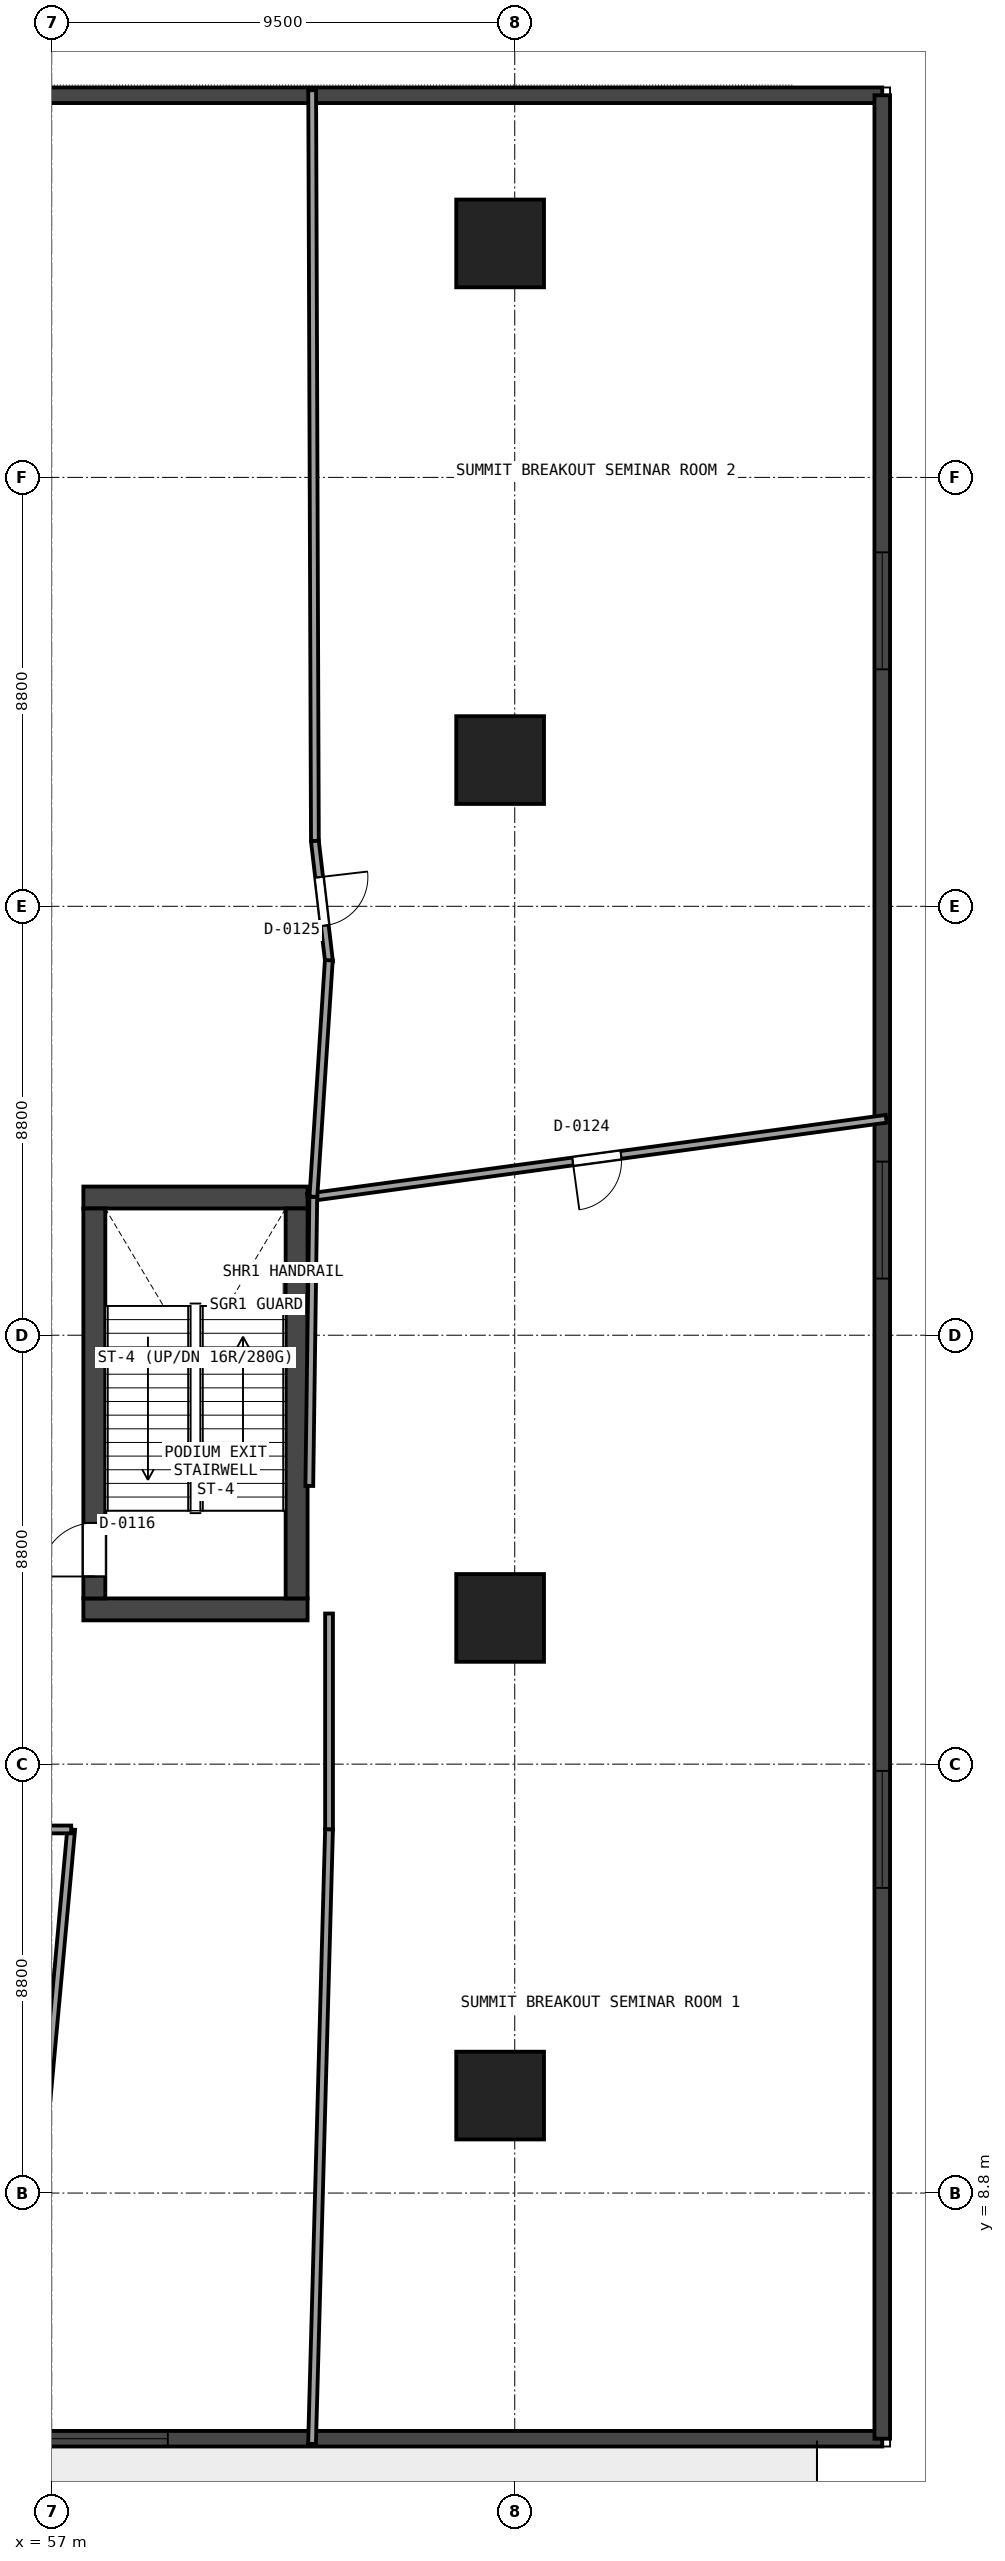
"""IFC4 building model, lengths in metres.
Left out: names, types, materials, properties, quantities, classifications, styles, units other than length and angle.
Written with IfcOpenShell. Run it as: python <this file> out.ifc"""

import sys

from ifc_helpers import new_model, si_unit, direction, frame, frame_2d, origin, origin_2d, place, context, subcontext, project, spatial, rectangle, extrude, element, fill, save


model = new_model("IFC4")
c1 = context("Model", 3, precision=1e-05, world=origin(), true_north=direction((0.0, 1.0)))
c2 = subcontext(c1, "Body", "Model", "MODEL_VIEW")
j1 = project(units=[si_unit("LENGTHUNIT", "METRE"), si_unit("PLANEANGLEUNIT", "RADIAN")], contexts=[c1])
p1 = place(None, origin())
s1 = spatial("IfcSite", under=j1, at=p1, CompositionType="ELEMENT")
p2 = place(p1, origin())
s2 = spatial("IfcBuilding", under=s1, at=p2, CompositionType="ELEMENT")
p3 = place(p2, frame((0.0, 0.0, 5.4)))
s3 = spatial("IfcBuildingStorey", under=s2, at=p3, CompositionType="ELEMENT", Elevation=5.4)
for number, where, z_axis, x_axis in (
    (1, (57.65, 20.775, 0.0), (0.0, 0.0, 1.0), (1.0, 0.0, 0.0)),
    (2, (57.65, 29.225, 0.0), (0.0, 0.0, 1.0), (1.0, 0.0, 0.0)),
):
    element("IfcWall", number, at=place(p3, frame(where, z_axis=z_axis, x_axis=x_axis)), inside=s3, PredefinedType="SHEAR", context=c2, shape_type="SweptSolid", body=[
        extrude(rectangle(XDim=4.6, YDim=0.45, at=frame_2d((2.3, 0.0))), origin(), (0.0, 0.0, 1.0), 5.05),
    ])
p4 = place(p3, frame((57.875, 21.0, 0.0), z_axis=(0.0, 0.0, 1.0), x_axis=(0.0, 1.0, 0.0)))
e3 = element("IfcWall", 3, at=p4, inside=s3, PredefinedType="SHEAR", context=c2, shape_type="SweptSolid", body=[
    extrude(rectangle(XDim=8.0, YDim=0.45, at=frame_2d((4.0, 0.0))), origin(), (0.0, 0.0, 1.0), 5.05),
])
p5 = place(p4, frame((0.45, 0.0, 0.0)))
e4 = element("IfcOpeningElement", 4, at=p5, cuts=e3, PredefinedType="OPENING", context=c2, shape_type="SweptSolid", body=[
    extrude(rectangle(XDim=1.1, YDim=2.15, at=frame_2d((0.55, 1.075))), frame((0.0, 0.235, 0.0), z_axis=(0.0, -1.0, 0.0), x_axis=(1.0, 0.0, 0.0)), (0.0, 0.0, 1.0), 0.47),
])
p6 = place(p3, frame((62.025, 21.0, 0.0), z_axis=(0.0, 0.0, 1.0), x_axis=(0.0, 1.0, 0.0)))
e5 = element("IfcWall", 5, at=p6, inside=s3, PredefinedType="SHEAR", context=c2, shape_type="SweptSolid", body=[
    extrude(rectangle(XDim=8.0, YDim=0.45, at=frame_2d((4.0, 0.0))), origin(), (0.0, 0.0, 1.0), 5.05),
])
for number, where, z_axis, x_axis in (
    (6, (66.2, 10.8, 0.0), (0.0, 0.0, 1.0), (1.0, 0.0, 0.0)),
    (7, (66.2, 20.6, 0.0), (0.0, 0.0, 1.0), (1.0, 0.0, 0.0)),
    (8, (66.2, 38.2, 0.0), (0.0, 0.0, 1.0), (1.0, 0.0, 0.0)),
    (9, (66.2, 48.8, 0.0), (0.0, 0.0, 1.0), (1.0, 0.0, 0.0)),
):
    element("IfcColumn", number, at=place(p3, frame(where, z_axis=z_axis, x_axis=x_axis)), inside=s3, PredefinedType="COLUMN", context=c2, shape_type="SweptSolid", body=[
        extrude(rectangle(XDim=1.8, YDim=1.8, at=origin_2d()), origin(), (0.0, 0.0, 1.0), 5.05),
    ])
p7 = place(p3, frame((74.04, 3.76, 0.0), z_axis=(0.0, 0.0, 1.0), x_axis=(-1.0, 0.0, 0.0)))
e10 = element("IfcWall", 10, at=p7, inside=s3, PredefinedType="SOLIDWALL", context=c2, shape_type="SweptSolid", body=[
    extrude(rectangle(XDim=72.08, YDim=0.32, at=frame_2d((36.04, 0.0))), origin(), (0.0, 0.0, 1.0), 5.05),
])
p8 = place(p7, frame((14.658, 0.0, 0.95)))
e11 = element("IfcOpeningElement", 11, at=p8, cuts=e10, PredefinedType="OPENING", context=c2, shape_type="SweptSolid", body=[
    extrude(rectangle(XDim=2.4, YDim=2.5, at=frame_2d((1.2, 1.25))), frame((0.0, 0.17, 0.0), z_axis=(0.0, -1.0, 0.0), x_axis=(1.0, 0.0, 0.0)), (0.0, 0.0, 1.0), 0.34),
])
p9 = place(p7, frame((52.139, 0.0, 0.95)))
e12 = element("IfcOpeningElement", 12, at=p9, cuts=e10, PredefinedType="OPENING", context=c2, shape_type="SweptSolid", body=[
    extrude(rectangle(XDim=2.4, YDim=2.5, at=frame_2d((1.2, 1.25))), frame((0.0, 0.17, 0.0), z_axis=(0.0, -1.0, 0.0), x_axis=(1.0, 0.0, 0.0)), (0.0, 0.0, 1.0), 0.34),
])
p10 = place(p7, frame((38.44, 0.0, 0.0)))
e13 = element("IfcOpeningElement", 13, at=p10, cuts=e10, PredefinedType="OPENING", context=c2, shape_type="SweptSolid", body=[
    extrude(rectangle(XDim=1.2, YDim=2.2, at=frame_2d((0.6, 1.1))), frame((0.0, 0.17, 0.0), z_axis=(0.0, -1.0, 0.0), x_axis=(1.0, 0.0, 0.0)), (0.0, 0.0, 1.0), 0.34),
])
p11 = place(p3, frame((1.96, 51.84, 0.0), z_axis=(0.0, 0.0, 1.0), x_axis=(1.0, 0.0, 0.0)))
e14 = element("IfcWall", 14, at=p11, inside=s3, PredefinedType="SOLIDWALL", context=c2, shape_type="SweptSolid", body=[
    extrude(rectangle(XDim=72.08, YDim=0.32, at=frame_2d((36.04, 0.0))), origin(), (0.0, 0.0, 1.0), 5.05),
])
p12 = place(p11, frame((14.658, 0.0, 0.95)))
e15 = element("IfcOpeningElement", 15, at=p12, cuts=e14, PredefinedType="OPENING", context=c2, shape_type="SweptSolid", body=[
    extrude(rectangle(XDim=2.4, YDim=2.5, at=frame_2d((1.2, 1.25))), frame((0.0, 0.17, 0.0), z_axis=(0.0, -1.0, 0.0), x_axis=(1.0, 0.0, 0.0)), (0.0, 0.0, 1.0), 0.34),
])
p13 = place(p11, frame((33.398, 0.0, 0.95)))
e16 = element("IfcOpeningElement", 16, at=p13, cuts=e14, PredefinedType="OPENING", context=c2, shape_type="SweptSolid", body=[
    extrude(rectangle(XDim=2.4, YDim=2.5, at=frame_2d((1.2, 1.25))), frame((0.0, 0.17, 0.0), z_axis=(0.0, -1.0, 0.0), x_axis=(1.0, 0.0, 0.0)), (0.0, 0.0, 1.0), 0.34),
])
p14 = place(p11, frame((52.139, 0.0, 0.95)))
e17 = element("IfcOpeningElement", 17, at=p14, cuts=e14, PredefinedType="OPENING", context=c2, shape_type="SweptSolid", body=[
    extrude(rectangle(XDim=2.4, YDim=2.5, at=frame_2d((1.2, 1.25))), frame((0.0, 0.17, 0.0), z_axis=(0.0, -1.0, 0.0), x_axis=(1.0, 0.0, 0.0)), (0.0, 0.0, 1.0), 0.34),
])
p15 = place(p3, frame((74.04, 51.84, 0.0), z_axis=(0.0, 0.0, 1.0), x_axis=(0.0, -1.0, 0.0)))
e18 = element("IfcWall", 18, at=p15, inside=s3, PredefinedType="SOLIDWALL", context=c2, shape_type="SweptSolid", body=[
    extrude(rectangle(XDim=48.08, YDim=0.32, at=frame_2d((24.04, 0.0))), origin(), (0.0, 0.0, 1.0), 5.05),
])
p16 = place(p15, frame((9.378, 0.0, 0.95)))
e19 = element("IfcOpeningElement", 19, at=p16, cuts=e18, PredefinedType="OPENING", context=c2, shape_type="SweptSolid", body=[
    extrude(rectangle(XDim=2.4, YDim=2.5, at=frame_2d((1.2, 1.25))), frame((0.0, 0.17, 0.0), z_axis=(0.0, -1.0, 0.0), x_axis=(1.0, 0.0, 0.0)), (0.0, 0.0, 1.0), 0.34),
])
p17 = place(p15, frame((21.878, 0.0, 0.95)))
e20 = element("IfcOpeningElement", 20, at=p17, cuts=e18, PredefinedType="OPENING", context=c2, shape_type="SweptSolid", body=[
    extrude(rectangle(XDim=2.4, YDim=2.5, at=frame_2d((1.2, 1.25))), frame((0.0, 0.17, 0.0), z_axis=(0.0, -1.0, 0.0), x_axis=(1.0, 0.0, 0.0)), (0.0, 0.0, 1.0), 0.34),
])
p18 = place(p15, frame((34.379, 0.0, 0.95)))
e21 = element("IfcOpeningElement", 21, at=p18, cuts=e18, PredefinedType="OPENING", context=c2, shape_type="SweptSolid", body=[
    extrude(rectangle(XDim=2.4, YDim=2.5, at=frame_2d((1.2, 1.25))), frame((0.0, 0.17, 0.0), z_axis=(0.0, -1.0, 0.0), x_axis=(1.0, 0.0, 0.0)), (0.0, 0.0, 1.0), 0.34),
])
p19 = place(p3, frame((56.249, 3.661, 0.0), z_axis=(0.0, 0.0, 1.0), x_axis=(0.090967236709, 0.995853885791, 0.0)))
e22 = element("IfcWall", 22, at=p19, inside=s3, PredefinedType="PARTITIONING", context=c2, shape_type="SweptSolid", body=[
    extrude(rectangle(XDim=12.652, YDim=0.16, at=frame_2d((6.326, 0.0))), origin(), (0.0, 0.0, 1.0), 4.123),
])
p20 = place(p3, frame((57.4, 16.26, 0.0), z_axis=(0.0, 0.0, 1.0), x_axis=(-1.0, 0.0, 0.0)))
e23 = element("IfcWall", 23, at=p20, inside=s3, PredefinedType="PARTITIONING", context=c2, shape_type="SweptSolid", body=[
    extrude(rectangle(XDim=32.909, YDim=0.16, at=frame_2d((16.455, 0.0))), origin(), (0.0, 0.0, 1.0), 4.203),
])
p21 = place(p20, frame((15.955, 0.0, 0.0)))
e24 = element("IfcOpeningElement", 24, at=p21, cuts=e23, PredefinedType="OPENING", context=c2, shape_type="SweptSolid", body=[
    extrude(rectangle(XDim=1.0, YDim=2.15, at=frame_2d((0.5, 1.075))), frame((0.0, 0.09, 0.0), z_axis=(0.0, -1.0, 0.0), x_axis=(1.0, 0.0, 0.0)), (0.0, 0.0, 1.0), 0.18),
])
p22 = place(p3, frame((74.121, 30.84, 0.0), z_axis=(0.0, 0.0, 1.0), x_axis=(-0.990872529163, -0.13480219193, 0.0)))
e25 = element("IfcWall", 25, at=p22, inside=s3, PredefinedType="PARTITIONING", context=c2, shape_type="SweptSolid", body=[
    extrude(rectangle(XDim=11.98, YDim=0.16, at=frame_2d((5.99, 0.0))), origin(), (0.0, 0.0, 1.0), 4.123),
])
p23 = place(p22, frame((5.49, 0.0, 0.0)))
e26 = element("IfcOpeningElement", 26, at=p23, cuts=e25, PredefinedType="OPENING", context=c2, shape_type="SweptSolid", body=[
    extrude(rectangle(XDim=1.0, YDim=2.15, at=frame_2d((0.5, 1.075))), frame((0.0, 0.09, 0.0), z_axis=(0.0, -1.0, 0.0), x_axis=(1.0, 0.0, 0.0)), (0.0, 0.0, 1.0), 0.18),
])
p24 = place(p3, frame((62.367, 29.241, 0.0), z_axis=(0.0, 0.0, 1.0), x_axis=(-0.013825270041, -0.999904426387, 0.0)))
e27 = element("IfcWall", 27, at=p24, inside=s3, PredefinedType="PARTITIONING", context=c2, shape_type="SweptSolid", body=[
    extrude(rectangle(XDim=5.933, YDim=0.16, at=frame_2d((2.967, 0.0))), origin(), (0.0, 0.0, 1.0), 5.05),
])
p25 = place(p3, frame((62.69, 20.69, 0.0), z_axis=(0.0, 0.0, 1.0), x_axis=(0.0, -1.0, 0.0)))
e28 = element("IfcWall", 28, at=p25, inside=s3, PredefinedType="PARTITIONING", context=c2, shape_type="SweptSolid", body=[
    extrude(rectangle(XDim=4.43, YDim=0.16, at=frame_2d((2.215, 0.0))), origin(), (0.0, 0.0, 1.0), 4.135),
])
p26 = place(p3, frame((62.69, 16.26, 0.0), z_axis=(0.0, 0.0, 1.0), x_axis=(-0.027664969833, -0.999617251474, 0.0)))
e29 = element("IfcWall", 29, at=p26, inside=s3, PredefinedType="PARTITIONING", context=c2, shape_type="SweptSolid", body=[
    extrude(rectangle(XDim=12.611, YDim=0.16, at=frame_2d((6.305, 0.0))), origin(), (0.0, 0.0, 1.0), 4.123),
])
p27 = place(p3, frame((62.344, 51.943, 0.0), z_axis=(0.0, 0.0, 1.0), x_axis=(0.003629653858, -0.999993412785, 0.0)))
e30 = element("IfcWall", 30, at=p27, inside=s3, PredefinedType="PARTITIONING", context=c2, shape_type="SweptSolid", body=[
    extrude(rectangle(XDim=15.403, YDim=0.16, at=frame_2d((7.702, 0.0))), origin(), (0.0, 0.0, 1.0), 4.123),
])
p28 = place(p3, frame((62.4, 36.54, 0.0), z_axis=(0.0, 0.0, 1.0), x_axis=(0.116160443909, -0.993230462315, 0.0)))
e31 = element("IfcWall", 31, at=p28, inside=s3, PredefinedType="PARTITIONING", context=c2, shape_type="SweptSolid", body=[
    extrude(rectangle(XDim=2.497, YDim=0.16, at=frame_2d((1.249, 0.0))), origin(), (0.0, 0.0, 1.0), 4.679),
])
p29 = place(p28, frame((0.748, 0.0, 0.0)))
e32 = element("IfcOpeningElement", 32, at=p29, cuts=e31, PredefinedType="OPENING", context=c2, shape_type="SweptSolid", body=[
    extrude(rectangle(XDim=1.0, YDim=2.15, at=frame_2d((0.5, 1.075))), frame((0.0, 0.09, 0.0), z_axis=(0.0, -1.0, 0.0), x_axis=(1.0, 0.0, 0.0)), (0.0, 0.0, 1.0), 0.18),
])
p30 = place(p3, frame((62.686, 34.093, 0.0), z_axis=(0.0, 0.0, 1.0), x_axis=(-0.065222606915, -0.997870738897, 0.0)))
e33 = element("IfcWall", 33, at=p30, inside=s3, PredefinedType="PARTITIONING", context=c2, shape_type="SweptSolid", body=[
    extrude(rectangle(XDim=4.862, YDim=0.16, at=frame_2d((2.431, 0.0))), origin(), (0.0, 0.0, 1.0), 5.05),
])
p31 = place(p16, origin())
e34 = element("IfcWindow", 34, at=p31, inside=s3, PartitioningType="SINGLE_PANEL", PredefinedType="WINDOW", context=c2, shape_type="SweptSolid", body=[
    extrude(rectangle(XDim=2.4, YDim=2.5, at=frame_2d((1.2, 1.25))), frame((0.0, 0.03, 0.0), z_axis=(0.0, -1.0, 0.0), x_axis=(1.0, 0.0, 0.0)), (0.0, 0.0, 1.0), 0.06),
])
fill(e19, e34)
p32 = place(p17, origin())
e35 = element("IfcWindow", 35, at=p32, inside=s3, PartitioningType="SINGLE_PANEL", PredefinedType="WINDOW", context=c2, shape_type="SweptSolid", body=[
    extrude(rectangle(XDim=2.4, YDim=2.5, at=frame_2d((1.2, 1.25))), frame((0.0, 0.03, 0.0), z_axis=(0.0, -1.0, 0.0), x_axis=(1.0, 0.0, 0.0)), (0.0, 0.0, 1.0), 0.06),
])
fill(e20, e35)
p33 = place(p18, origin())
e36 = element("IfcWindow", 36, at=p33, inside=s3, PartitioningType="SINGLE_PANEL", PredefinedType="WINDOW", context=c2, shape_type="SweptSolid", body=[
    extrude(rectangle(XDim=2.4, YDim=2.5, at=frame_2d((1.2, 1.25))), frame((0.0, 0.03, 0.0), z_axis=(0.0, -1.0, 0.0), x_axis=(1.0, 0.0, 0.0)), (0.0, 0.0, 1.0), 0.06),
])
fill(e21, e36)
p34 = place(p8, origin())
e37 = element("IfcWindow", 37, at=p34, inside=s3, PartitioningType="SINGLE_PANEL", PredefinedType="WINDOW", context=c2, shape_type="SweptSolid", body=[
    extrude(rectangle(XDim=2.4, YDim=2.5, at=frame_2d((1.2, 1.25))), frame((0.0, 0.03, 0.0), z_axis=(0.0, -1.0, 0.0), x_axis=(1.0, 0.0, 0.0)), (0.0, 0.0, 1.0), 0.06),
])
fill(e11, e37)
p35 = place(p5, origin())
e38 = element("IfcDoor", 38, at=p35, inside=s3, OperationType="SINGLE_SWING_LEFT", PredefinedType="DOOR", context=c2, shape_type="SweptSolid", body=[
    extrude(rectangle(XDim=1.1, YDim=2.15, at=frame_2d((0.55, 1.075))), frame((0.0, 0.025, 0.0), z_axis=(0.0, -1.0, 0.0), x_axis=(1.0, 0.0, 0.0)), (0.0, 0.0, 1.0), 0.05),
])
fill(e4, e38)
p36 = place(p23, origin())
e39 = element("IfcDoor", 39, at=p36, inside=s3, OperationType="SINGLE_SWING_RIGHT", PredefinedType="DOOR", context=c2, shape_type="SweptSolid", body=[
    extrude(rectangle(XDim=1.0, YDim=2.15, at=frame_2d((0.5, 1.075))), frame((0.0, 0.025, 0.0), z_axis=(0.0, -1.0, 0.0), x_axis=(1.0, 0.0, 0.0)), (0.0, 0.0, 1.0), 0.05),
])
fill(e26, e39)
p37 = place(p29, origin())
e40 = element("IfcDoor", 40, at=p37, inside=s3, OperationType="SINGLE_SWING_LEFT", PredefinedType="DOOR", context=c2, shape_type="SweptSolid", body=[
    extrude(rectangle(XDim=1.0, YDim=2.15, at=frame_2d((0.5, 1.075))), frame((0.0, 0.025, 0.0), z_axis=(0.0, -1.0, 0.0), x_axis=(1.0, 0.0, 0.0)), (0.0, 0.0, 1.0), 0.05),
])
fill(e32, e40)
save(model, sys.argv[1])
